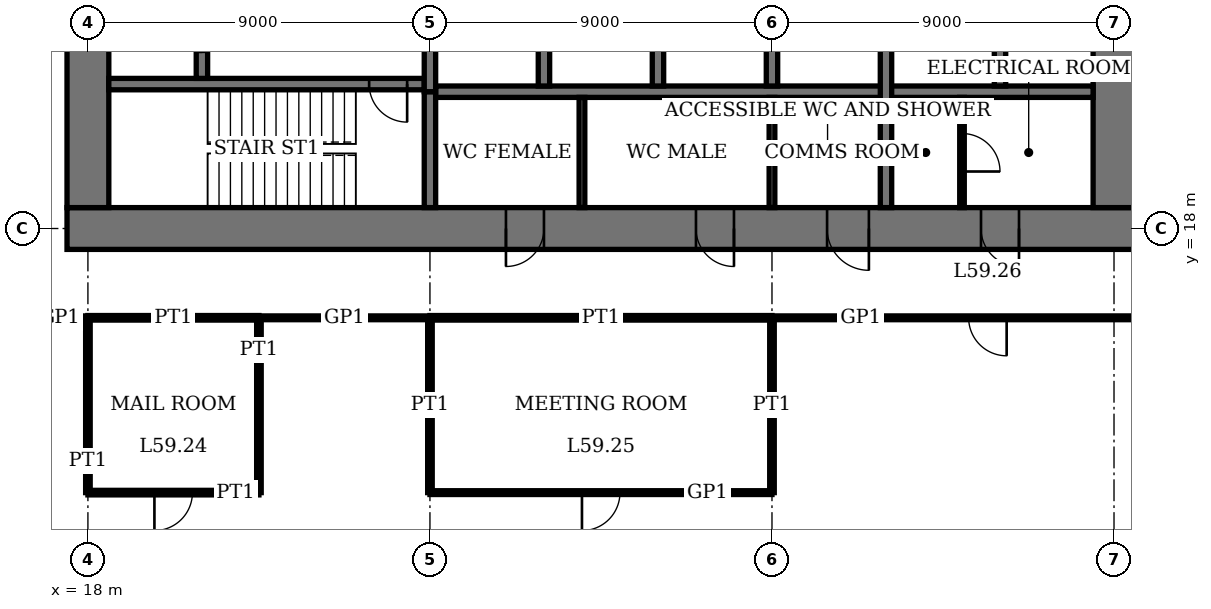
"""IFC4 building model, lengths in metres.
Left out: names, types, materials, properties, quantities, classifications, styles, units other than length and angle.
Written with IfcOpenShell. Run it as: python <this file> out.ifc"""

import sys

from ifc_helpers import new_model, si_unit, direction, frame, frame_2d, origin, place, context, subcontext, project, spatial, rectangle, extrude, element, fill, save


model = new_model("IFC4")
c1 = context("Model", 3, precision=1e-05, world=origin(), true_north=direction((0.0, 1.0)))
c2 = subcontext(c1, "Body", "Model", "MODEL_VIEW")
j1 = project(units=[si_unit("LENGTHUNIT", "METRE"), si_unit("PLANEANGLEUNIT", "RADIAN")], contexts=[c1])
p1 = place(None, origin())
s1 = spatial("IfcSite", under=j1, at=p1, CompositionType="ELEMENT")
p2 = place(p1, origin())
s2 = spatial("IfcBuilding", under=s1, at=p2, CompositionType="ELEMENT")
p3 = place(p2, frame((0.0, 0.0, 243.4)))
s3 = spatial("IfcBuildingStorey", under=s2, at=p3, CompositionType="ELEMENT", Elevation=243.4)
p4 = place(p3, frame((17.45, 18.0, 0.0), z_axis=(0.0, 0.0, 1.0), x_axis=(1.0, 0.0, 0.0)))
e1 = element("IfcWall", 1, at=p4, inside=s3, PredefinedType="SHEAR", context=c2, shape_type="SweptSolid", body=[
    extrude(rectangle(XDim=28.1, YDim=1.1, at=frame_2d((14.05, 0.0))), origin(), (0.0, 0.0, 1.0), 4.0),
])
p5 = place(p4, frame((11.55, 0.0, 0.0)))
e2 = element("IfcOpeningElement", 2, at=p5, cuts=e1, PredefinedType="OPENING", context=c2, shape_type="SweptSolid", body=[
    extrude(rectangle(XDim=1.0, YDim=2.4, at=frame_2d((0.5, 1.2))), frame((0.0, 0.56, 0.0), z_axis=(0.0, -1.0, 0.0), x_axis=(1.0, 0.0, 0.0)), (0.0, 0.0, 1.0), 1.12),
])
p6 = place(p4, frame((16.55, 0.0, 0.0)))
e3 = element("IfcOpeningElement", 3, at=p6, cuts=e1, PredefinedType="OPENING", context=c2, shape_type="SweptSolid", body=[
    extrude(rectangle(XDim=1.0, YDim=2.4, at=frame_2d((0.5, 1.2))), frame((0.0, 0.56, 0.0), z_axis=(0.0, -1.0, 0.0), x_axis=(1.0, 0.0, 0.0)), (0.0, 0.0, 1.0), 1.12),
])
p7 = place(p4, frame((20.0, 0.0, 0.0)))
e4 = element("IfcOpeningElement", 4, at=p7, cuts=e1, PredefinedType="OPENING", context=c2, shape_type="SweptSolid", body=[
    extrude(rectangle(XDim=1.1, YDim=2.4, at=frame_2d((0.55, 1.2))), frame((0.0, 0.56, 0.0), z_axis=(0.0, -1.0, 0.0), x_axis=(1.0, 0.0, 0.0)), (0.0, 0.0, 1.0), 1.12),
])
p8 = place(p4, frame((24.05, 0.0, 0.0)))
e5 = element("IfcOpeningElement", 5, at=p8, cuts=e1, PredefinedType="OPENING", context=c2, shape_type="SweptSolid", body=[
    extrude(rectangle(XDim=1.0, YDim=2.4, at=frame_2d((0.5, 1.2))), frame((0.0, 0.56, 0.0), z_axis=(0.0, -1.0, 0.0), x_axis=(1.0, 0.0, 0.0)), (0.0, 0.0, 1.0), 1.12),
])
p9 = place(p3, frame((18.0, 35.45, 0.0), z_axis=(0.0, 0.0, 1.0), x_axis=(0.0, -1.0, 0.0)))
e6 = element("IfcWall", 6, at=p9, inside=s3, PredefinedType="SHEAR", context=c2, shape_type="SweptSolid", body=[
    extrude(rectangle(XDim=16.9, YDim=1.1, at=frame_2d((8.45, 0.0))), origin(), (0.0, 0.0, 1.0), 4.0),
])
p10 = place(p9, frame((8.45, 0.0, 0.0)))
e7 = element("IfcOpeningElement", 7, at=p10, cuts=e6, PredefinedType="OPENING", context=c2, shape_type="SweptSolid", body=[
    extrude(rectangle(XDim=1.8, YDim=2.4, at=frame_2d((0.9, 1.2))), frame((0.0, 0.56, 0.0), z_axis=(0.0, -1.0, 0.0), x_axis=(1.0, 0.0, 0.0)), (0.0, 0.0, 1.0), 1.12),
])
p11 = place(p3, frame((45.0, 18.55, 0.0), z_axis=(0.0, 0.0, 1.0), x_axis=(0.0, 1.0, 0.0)))
e8 = element("IfcWall", 8, at=p11, inside=s3, PredefinedType="SHEAR", context=c2, shape_type="SweptSolid", body=[
    extrude(rectangle(XDim=16.9, YDim=1.1, at=frame_2d((8.45, 0.0))), origin(), (0.0, 0.0, 1.0), 4.0),
])
p12 = place(p11, frame((8.45, 0.0, 0.0)))
e9 = element("IfcOpeningElement", 9, at=p12, cuts=e8, PredefinedType="OPENING", context=c2, shape_type="SweptSolid", body=[
    extrude(rectangle(XDim=1.8, YDim=2.4, at=frame_2d((0.9, 1.2))), frame((0.0, 0.56, 0.0), z_axis=(0.0, -1.0, 0.0), x_axis=(1.0, 0.0, 0.0)), (0.0, 0.0, 1.0), 1.12),
])
p13 = place(p3, frame((18.55, 21.8, 0.0), z_axis=(0.0, 0.0, 1.0), x_axis=(1.0, 0.0, 0.0)))
e10 = element("IfcWall", 10, at=p13, inside=s3, PredefinedType="SHEAR", context=c2, shape_type="SweptSolid", body=[
    extrude(rectangle(XDim=8.3, YDim=0.3, at=frame_2d((4.15, 0.0))), origin(), (0.0, 0.0, 1.0), 4.0),
])
p14 = place(p13, frame((6.85, 0.0, 0.0)))
e11 = element("IfcOpeningElement", 11, at=p14, cuts=e10, PredefinedType="OPENING", context=c2, shape_type="SweptSolid", body=[
    extrude(rectangle(XDim=1.0, YDim=2.4, at=frame_2d((0.5, 1.2))), frame((0.0, 0.16, 0.0), z_axis=(0.0, -1.0, 0.0), x_axis=(1.0, 0.0, 0.0)), (0.0, 0.0, 1.0), 0.32),
])
p15 = place(p3, frame((27.0, 18.55, 0.0), z_axis=(0.0, 0.0, 1.0), x_axis=(0.0, 1.0, 0.0)))
e12 = element("IfcWall", 12, at=p15, inside=s3, PredefinedType="SHEAR", context=c2, shape_type="SweptSolid", body=[
    extrude(rectangle(XDim=3.05, YDim=0.3, at=frame_2d((1.525, 0.0))), origin(), (0.0, 0.0, 1.0), 4.0),
])
p16 = place(p3, frame((21.0, 21.95, 0.0), z_axis=(0.0, 0.0, 1.0), x_axis=(0.0, 1.0, 0.0)))
e13 = element("IfcWall", 13, at=p16, inside=s3, PredefinedType="SHEAR", context=c2, shape_type="SweptSolid", body=[
    extrude(rectangle(XDim=2.5, YDim=0.3, at=frame_2d((1.25, 0.0))), origin(), (0.0, 0.0, 1.0), 4.0),
])
p17 = place(p16, frame((0.7, 0.0, 0.0)))
e14 = element("IfcOpeningElement", 14, at=p17, cuts=e13, PredefinedType="OPENING", context=c2, shape_type="SweptSolid", body=[
    extrude(rectangle(XDim=1.1, YDim=2.4, at=frame_2d((0.55, 1.2))), frame((0.0, 0.16, 0.0), z_axis=(0.0, -1.0, 0.0), x_axis=(1.0, 0.0, 0.0)), (0.0, 0.0, 1.0), 0.32),
])
p18 = place(p3, frame((27.15, 21.6, 0.0), z_axis=(0.0, 0.0, 1.0), x_axis=(1.0, 0.0, 0.0)))
e15 = element("IfcWall", 15, at=p18, inside=s3, PredefinedType="SHEAR", context=c2, shape_type="SweptSolid", body=[
    extrude(rectangle(XDim=17.3, YDim=0.3, at=frame_2d((8.65, 0.0))), origin(), (0.0, 0.0, 1.0), 4.0),
])
for number, where, z_axis, x_axis in (
    (16, (30.0, 21.75, 0.0), (0.0, 0.0, 1.0), (0.0, 1.0, 0.0)),
    (17, (33.0, 21.75, 0.0), (0.0, 0.0, 1.0), (0.0, 1.0, 0.0)),
    (18, (36.0, 21.75, 0.0), (0.0, 0.0, 1.0), (0.0, 1.0, 0.0)),
):
    element("IfcWall", number, at=place(p3, frame(where, z_axis=z_axis, x_axis=x_axis)), inside=s3, PredefinedType="SHEAR", context=c2, shape_type="SweptSolid", body=[
        extrude(rectangle(XDim=2.7, YDim=0.3, at=frame_2d((1.35, 0.0))), origin(), (0.0, 0.0, 1.0), 4.0),
    ])
p19 = place(p3, frame((39.0, 18.55, 0.0), z_axis=(0.0, 0.0, 1.0), x_axis=(0.0, 1.0, 0.0)))
e19 = element("IfcWall", 19, at=p19, inside=s3, PredefinedType="SHEAR", context=c2, shape_type="SweptSolid", body=[
    extrude(rectangle(XDim=5.9, YDim=0.3, at=frame_2d((2.95, 0.0))), origin(), (0.0, 0.0, 1.0), 4.0),
])
p20 = place(p3, frame((42.0, 21.75, 0.0), z_axis=(0.0, 0.0, 1.0), x_axis=(0.0, 1.0, 0.0)))
e20 = element("IfcWall", 20, at=p20, inside=s3, PredefinedType="SHEAR", context=c2, shape_type="SweptSolid", body=[
    extrude(rectangle(XDim=2.7, YDim=0.3, at=frame_2d((1.35, 0.0))), origin(), (0.0, 0.0, 1.0), 4.0),
])
p21 = place(p3, frame((27.0, 21.6, 0.0), z_axis=(0.0, 0.0, 1.0), x_axis=(0.0, 1.0, 0.0)))
e21 = element("IfcWall", 21, at=p21, inside=s3, PredefinedType="SHEAR", context=c2, shape_type="SweptSolid", body=[
    extrude(rectangle(XDim=2.85, YDim=0.3, at=frame_2d((1.425, 0.0))), origin(), (0.0, 0.0, 1.0), 4.0),
])
p22 = place(p3, frame((18.0, 11.05, 0.0), z_axis=(0.0, 0.0, 1.0), x_axis=(1.0, 0.0, 0.0)))
e22 = element("IfcWall", 22, at=p22, inside=s3, PredefinedType="PARTITIONING", context=c2, shape_type="SweptSolid", body=[
    extrude(rectangle(XDim=4.5, YDim=0.12, at=frame_2d((2.25, 0.0))), origin(), (0.0, 0.0, 1.0), 3.75),
])
p23 = place(p22, frame((1.75, 0.0, 0.0)))
e23 = element("IfcOpeningElement", 23, at=p23, cuts=e22, PredefinedType="OPENING", context=c2, shape_type="SweptSolid", body=[
    extrude(rectangle(XDim=1.0, YDim=2.4, at=frame_2d((0.5, 1.2))), frame((0.0, 0.07, 0.0), z_axis=(0.0, -1.0, 0.0), x_axis=(1.0, 0.0, 0.0)), (0.0, 0.0, 1.0), 0.14),
])
p24 = place(p3, frame((27.0, 11.05, 0.0), z_axis=(0.0, 0.0, 1.0), x_axis=(1.0, 0.0, 0.0)))
e24 = element("IfcWall", 24, at=p24, inside=s3, PredefinedType="PARTITIONING", context=c2, shape_type="SweptSolid", body=[
    extrude(rectangle(XDim=9.0, YDim=0.1, at=frame_2d((4.5, 0.0))), origin(), (0.0, 0.0, 1.0), 3.75),
])
p25 = place(p24, frame((4.0, 0.0, 0.0)))
e25 = element("IfcOpeningElement", 25, at=p25, cuts=e24, PredefinedType="OPENING", context=c2, shape_type="SweptSolid", body=[
    extrude(rectangle(XDim=1.0, YDim=2.4, at=frame_2d((0.5, 1.2))), frame((0.0, 0.06, 0.0), z_axis=(0.0, -1.0, 0.0), x_axis=(1.0, 0.0, 0.0)), (0.0, 0.0, 1.0), 0.12),
])
p26 = place(p3, frame((18.0, 15.65, 0.0), z_axis=(0.0, 0.0, 1.0), x_axis=(1.0, 0.0, 0.0)))
e26 = element("IfcWall", 26, at=p26, inside=s3, PredefinedType="PARTITIONING", context=c2, shape_type="SweptSolid", body=[
    extrude(rectangle(XDim=4.5, YDim=0.12, at=frame_2d((2.25, 0.0))), origin(), (0.0, 0.0, 1.0), 3.75),
])
p27 = place(p3, frame((27.0, 15.65, 0.0), z_axis=(0.0, 0.0, 1.0), x_axis=(1.0, 0.0, 0.0)))
e27 = element("IfcWall", 27, at=p27, inside=s3, PredefinedType="PARTITIONING", context=c2, shape_type="SweptSolid", body=[
    extrude(rectangle(XDim=9.0, YDim=0.12, at=frame_2d((4.5, 0.0))), origin(), (0.0, 0.0, 1.0), 3.75),
])
p28 = place(p3, frame((36.01, 15.65, 0.0), z_axis=(0.0, 0.0, 1.0), x_axis=(1.0, 0.0, 0.0)))
e28 = element("IfcWall", 28, at=p28, inside=s3, PredefinedType="PARTITIONING", context=c2, shape_type="SweptSolid", body=[
    extrude(rectangle(XDim=11.33, YDim=0.1, at=frame_2d((5.665, 0.0))), origin(), (0.0, 0.0, 1.0), 3.75),
])
p29 = place(p28, frame((5.165, 0.0, 0.0)))
e29 = element("IfcOpeningElement", 29, at=p29, cuts=e28, PredefinedType="OPENING", context=c2, shape_type="SweptSolid", body=[
    extrude(rectangle(XDim=1.0, YDim=2.4, at=frame_2d((0.5, 1.2))), frame((0.0, 0.06, 0.0), z_axis=(0.0, -1.0, 0.0), x_axis=(1.0, 0.0, 0.0)), (0.0, 0.0, 1.0), 0.12),
])
p30 = place(p3, frame((22.51, 15.65, 0.0), z_axis=(0.0, 0.0, 1.0), x_axis=(1.0, 0.0, 0.0)))
e30 = element("IfcWall", 30, at=p30, inside=s3, PredefinedType="PARTITIONING", context=c2, shape_type="SweptSolid", body=[
    extrude(rectangle(XDim=4.48, YDim=0.1, at=frame_2d((2.24, 0.0))), origin(), (0.0, 0.0, 1.0), 3.75),
])
p31 = place(p3, frame((15.66, 15.65, 0.0), z_axis=(0.0, 0.0, 1.0), x_axis=(1.0, 0.0, 0.0)))
e31 = element("IfcWall", 31, at=p31, inside=s3, PredefinedType="PARTITIONING", context=c2, shape_type="SweptSolid", body=[
    extrude(rectangle(XDim=2.33, YDim=0.1, at=frame_2d((1.165, 0.0))), origin(), (0.0, 0.0, 1.0), 3.75),
])
p32 = place(p3, frame((18.0, 11.05, 0.0), z_axis=(0.0, 0.0, 1.0), x_axis=(0.0, 1.0, 0.0)))
e32 = element("IfcWall", 32, at=p32, inside=s3, PredefinedType="PARTITIONING", context=c2, shape_type="SweptSolid", body=[
    extrude(rectangle(XDim=4.6, YDim=0.12, at=frame_2d((2.3, 0.0))), origin(), (0.0, 0.0, 1.0), 3.05),
])
p33 = place(p3, frame((22.5, 11.05, 0.0), z_axis=(0.0, 0.0, 1.0), x_axis=(0.0, 1.0, 0.0)))
e33 = element("IfcWall", 33, at=p33, inside=s3, PredefinedType="PARTITIONING", context=c2, shape_type="SweptSolid", body=[
    extrude(rectangle(XDim=4.6, YDim=0.12, at=frame_2d((2.3, 0.0))), origin(), (0.0, 0.0, 1.0), 3.75),
])
for number, where, z_axis, x_axis in (
    (34, (27.0, 11.05, 0.0), (0.0, 0.0, 1.0), (0.0, 1.0, 0.0)),
    (35, (36.0, 11.05, 0.0), (0.0, 0.0, 1.0), (0.0, 1.0, 0.0)),
):
    element("IfcWall", number, at=place(p3, frame(where, z_axis=z_axis, x_axis=x_axis)), inside=s3, PredefinedType="PARTITIONING", context=c2, shape_type="SweptSolid", body=[
        extrude(rectangle(XDim=4.6, YDim=0.12, at=frame_2d((2.3, 0.0))), origin(), (0.0, 0.0, 1.0), 3.05),
    ])
for number, where, z_axis, x_axis in (
    (36, (31.0, 18.55, 0.0), (0.0, 0.0, 1.0), (0.0, 1.0, 0.0)),
    (37, (36.0, 18.55, 0.0), (0.0, 0.0, 1.0), (0.0, 1.0, 0.0)),
):
    element("IfcWall", number, at=place(p3, frame(where, z_axis=z_axis, x_axis=x_axis)), inside=s3, PredefinedType="PARTITIONING", context=c2, shape_type="SweptSolid", body=[
        extrude(rectangle(XDim=2.9, YDim=0.15, at=frame_2d((1.45, 0.0))), origin(), (0.0, 0.0, 1.0), 3.75),
    ])
p34 = place(p3, frame((41.0, 18.55, 0.0), z_axis=(0.0, 0.0, 1.0), x_axis=(0.0, 1.0, 0.0)))
e38 = element("IfcWall", 38, at=p34, inside=s3, PredefinedType="PARTITIONING", context=c2, shape_type="SweptSolid", body=[
    extrude(rectangle(XDim=2.9, YDim=0.12, at=frame_2d((1.45, 0.0))), origin(), (0.0, 0.0, 1.0), 3.75),
])
p35 = place(p34, frame((0.95, 0.0, 0.0)))
e39 = element("IfcOpeningElement", 39, at=p35, cuts=e38, PredefinedType="OPENING", context=c2, shape_type="SweptSolid", body=[
    extrude(rectangle(XDim=1.0, YDim=2.4, at=frame_2d((0.5, 1.2))), frame((0.0, 0.07, 0.0), z_axis=(0.0, -1.0, 0.0), x_axis=(1.0, 0.0, 0.0)), (0.0, 0.0, 1.0), 0.14),
])
p36 = place(p5, origin())
e40 = element("IfcDoor", 40, at=p36, inside=s3, OperationType="SINGLE_SWING_LEFT", PredefinedType="DOOR", context=c2, shape_type="SweptSolid", body=[
    extrude(rectangle(XDim=1.0, YDim=2.4, at=frame_2d((0.5, 1.2))), frame((0.0, 0.025, 0.0), z_axis=(0.0, -1.0, 0.0), x_axis=(1.0, 0.0, 0.0)), (0.0, 0.0, 1.0), 0.05),
    extrude(rectangle(XDim=0.04, YDim=2.4, at=frame_2d((0.02, 1.2))), frame((0.0, 0.4, 0.0), z_axis=(0.0, -1.0, 0.0), x_axis=(1.0, 0.0, 0.0)), (0.0, 0.0, 1.0), 0.8),
    extrude(rectangle(XDim=0.04, YDim=2.4, at=frame_2d((0.98, 1.2))), frame((0.0, 0.4, 0.0), z_axis=(0.0, -1.0, 0.0), x_axis=(1.0, 0.0, 0.0)), (0.0, 0.0, 1.0), 0.8),
    extrude(rectangle(XDim=1.0, YDim=0.04, at=frame_2d((0.5, 2.38))), frame((0.0, 0.4, 0.0), z_axis=(0.0, -1.0, 0.0), x_axis=(1.0, 0.0, 0.0)), (0.0, 0.0, 1.0), 0.8),
])
fill(e2, e40)
p37 = place(p6, origin())
e41 = element("IfcDoor", 41, at=p37, inside=s3, OperationType="SINGLE_SWING_RIGHT", PredefinedType="DOOR", context=c2, shape_type="SweptSolid", body=[
    extrude(rectangle(XDim=1.0, YDim=2.4, at=frame_2d((0.5, 1.2))), frame((0.0, 0.025, 0.0), z_axis=(0.0, -1.0, 0.0), x_axis=(1.0, 0.0, 0.0)), (0.0, 0.0, 1.0), 0.05),
    extrude(rectangle(XDim=0.04, YDim=2.4, at=frame_2d((0.02, 1.2))), frame((0.0, 0.4, 0.0), z_axis=(0.0, -1.0, 0.0), x_axis=(1.0, 0.0, 0.0)), (0.0, 0.0, 1.0), 0.8),
    extrude(rectangle(XDim=0.04, YDim=2.4, at=frame_2d((0.98, 1.2))), frame((0.0, 0.4, 0.0), z_axis=(0.0, -1.0, 0.0), x_axis=(1.0, 0.0, 0.0)), (0.0, 0.0, 1.0), 0.8),
    extrude(rectangle(XDim=1.0, YDim=0.04, at=frame_2d((0.5, 2.38))), frame((0.0, 0.4, 0.0), z_axis=(0.0, -1.0, 0.0), x_axis=(1.0, 0.0, 0.0)), (0.0, 0.0, 1.0), 0.8),
])
fill(e3, e41)
p38 = place(p7, origin())
e42 = element("IfcDoor", 42, at=p38, inside=s3, OperationType="SINGLE_SWING_RIGHT", PredefinedType="DOOR", context=c2, shape_type="SweptSolid", body=[
    extrude(rectangle(XDim=1.1, YDim=2.4, at=frame_2d((0.55, 1.2))), frame((0.0, 0.025, 0.0), z_axis=(0.0, -1.0, 0.0), x_axis=(1.0, 0.0, 0.0)), (0.0, 0.0, 1.0), 0.05),
    extrude(rectangle(XDim=0.04, YDim=2.4, at=frame_2d((0.02, 1.2))), frame((0.0, 0.44, 0.0), z_axis=(0.0, -1.0, 0.0), x_axis=(1.0, 0.0, 0.0)), (0.0, 0.0, 1.0), 0.88),
    extrude(rectangle(XDim=0.04, YDim=2.4, at=frame_2d((1.08, 1.2))), frame((0.0, 0.44, 0.0), z_axis=(0.0, -1.0, 0.0), x_axis=(1.0, 0.0, 0.0)), (0.0, 0.0, 1.0), 0.88),
    extrude(rectangle(XDim=1.1, YDim=0.04, at=frame_2d((0.55, 2.38))), frame((0.0, 0.44, 0.0), z_axis=(0.0, -1.0, 0.0), x_axis=(1.0, 0.0, 0.0)), (0.0, 0.0, 1.0), 0.88),
])
fill(e4, e42)
p39 = place(p8, origin())
e43 = element("IfcDoor", 43, at=p39, inside=s3, OperationType="SINGLE_SWING_RIGHT", PredefinedType="DOOR", context=c2, shape_type="SweptSolid", body=[
    extrude(rectangle(XDim=1.0, YDim=2.4, at=frame_2d((0.5, 1.2))), frame((0.0, 0.025, 0.0), z_axis=(0.0, -1.0, 0.0), x_axis=(1.0, 0.0, 0.0)), (0.0, 0.0, 1.0), 0.05),
    extrude(rectangle(XDim=0.04, YDim=2.4, at=frame_2d((0.02, 1.2))), frame((0.0, 0.4, 0.0), z_axis=(0.0, -1.0, 0.0), x_axis=(1.0, 0.0, 0.0)), (0.0, 0.0, 1.0), 0.8),
    extrude(rectangle(XDim=0.04, YDim=2.4, at=frame_2d((0.98, 1.2))), frame((0.0, 0.4, 0.0), z_axis=(0.0, -1.0, 0.0), x_axis=(1.0, 0.0, 0.0)), (0.0, 0.0, 1.0), 0.8),
    extrude(rectangle(XDim=1.0, YDim=0.04, at=frame_2d((0.5, 2.38))), frame((0.0, 0.4, 0.0), z_axis=(0.0, -1.0, 0.0), x_axis=(1.0, 0.0, 0.0)), (0.0, 0.0, 1.0), 0.8),
])
fill(e5, e43)
p40 = place(p14, origin())
e44 = element("IfcDoor", 44, at=p40, inside=s3, OperationType="SINGLE_SWING_RIGHT", PredefinedType="DOOR", context=c2, shape_type="SweptSolid", body=[
    extrude(rectangle(XDim=1.0, YDim=2.4, at=frame_2d((0.5, 1.2))), frame((0.0, 0.03, 0.0), z_axis=(0.0, -1.0, 0.0), x_axis=(1.0, 0.0, 0.0)), (0.0, 0.0, 1.0), 0.06),
])
fill(e11, e44)
p41 = place(p23, origin())
e45 = element("IfcDoor", 45, at=p41, inside=s3, OperationType="SINGLE_SWING_LEFT", PredefinedType="DOOR", context=c2, shape_type="SweptSolid", body=[
    extrude(rectangle(XDim=1.0, YDim=2.4, at=frame_2d((0.5, 1.2))), frame((0.0, 0.025, 0.0), z_axis=(0.0, -1.0, 0.0), x_axis=(1.0, 0.0, 0.0)), (0.0, 0.0, 1.0), 0.05),
])
fill(e23, e45)
p42 = place(p25, origin())
e46 = element("IfcDoor", 46, at=p42, inside=s3, OperationType="SINGLE_SWING_LEFT", PredefinedType="DOOR", context=c2, shape_type="SweptSolid", body=[
    extrude(rectangle(XDim=1.0, YDim=2.4, at=frame_2d((0.5, 1.2))), frame((0.0, 0.02, 0.0), z_axis=(0.0, -1.0, 0.0), x_axis=(1.0, 0.0, 0.0)), (0.0, 0.0, 1.0), 0.04),
])
fill(e25, e46)
p43 = place(p29, origin())
e47 = element("IfcDoor", 47, at=p43, inside=s3, OperationType="SINGLE_SWING_RIGHT", PredefinedType="DOOR", context=c2, shape_type="SweptSolid", body=[
    extrude(rectangle(XDim=1.0, YDim=2.4, at=frame_2d((0.5, 1.2))), frame((0.0, 0.02, 0.0), z_axis=(0.0, -1.0, 0.0), x_axis=(1.0, 0.0, 0.0)), (0.0, 0.0, 1.0), 0.04),
])
fill(e29, e47)
p44 = place(p35, origin())
e48 = element("IfcDoor", 48, at=p44, inside=s3, OperationType="SINGLE_SWING_LEFT", PredefinedType="DOOR", context=c2, shape_type="SweptSolid", body=[
    extrude(rectangle(XDim=1.0, YDim=2.4, at=frame_2d((0.5, 1.2))), frame((0.0, 0.03, 0.0), z_axis=(0.0, -1.0, 0.0), x_axis=(1.0, 0.0, 0.0)), (0.0, 0.0, 1.0), 0.06),
])
fill(e39, e48)
save(model, sys.argv[1])
